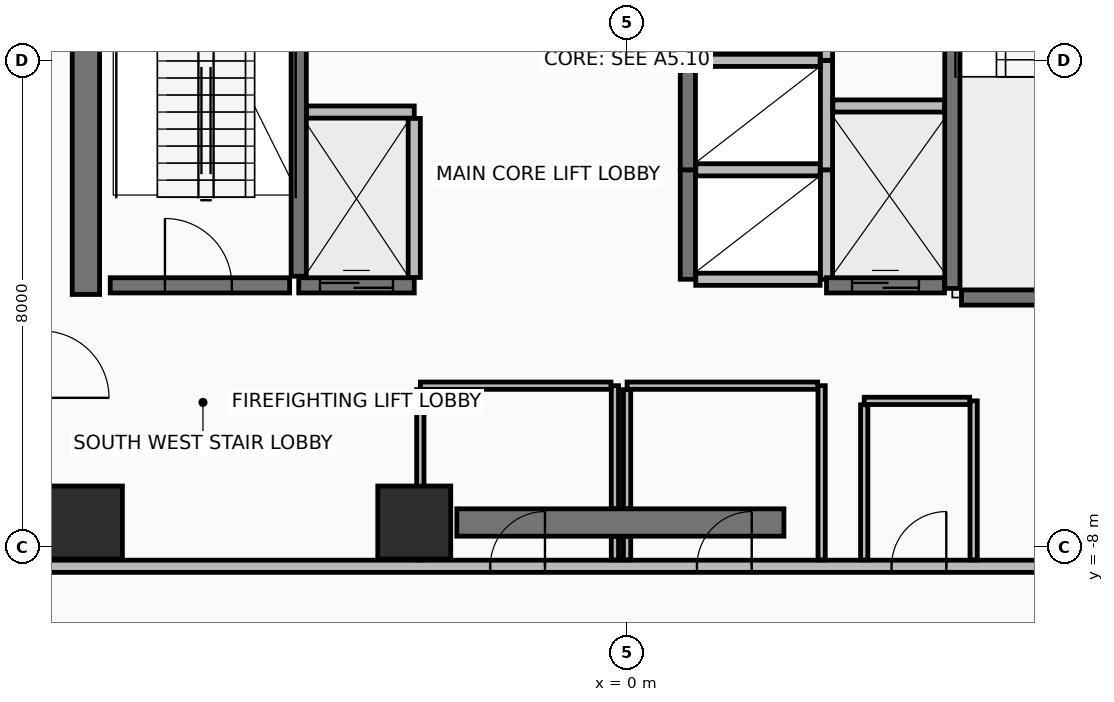
"""IFC4 building model, lengths in metres.
Left out: names, types, materials, properties, quantities, classifications, styles, units other than length and angle.
Written with IfcOpenShell. Run it as: python <this file> out.ifc"""

import sys

from ifc_helpers import new_model, si_unit, direction, frame, frame_2d, origin, origin_2d, place, context, subcontext, project, spatial, rectangle, extrude, element, fill, save


model = new_model("IFC4")
c1 = context("Model", 3, precision=1e-05, world=origin(), true_north=direction((0.0, 1.0)))
c2 = subcontext(c1, "Body", "Model", "MODEL_VIEW")
j1 = project(units=[si_unit("LENGTHUNIT", "METRE"), si_unit("PLANEANGLEUNIT", "RADIAN")], contexts=[c1])
p1 = place(None, origin())
s1 = spatial("IfcSite", under=j1, at=p1, CompositionType="ELEMENT")
p2 = place(p1, origin())
s2 = spatial("IfcBuilding", under=s1, at=p2, CompositionType="ELEMENT")
p3 = place(p2, frame((0.0, 0.0, 188.5)))
s3 = spatial("IfcBuildingStorey", under=s2, at=p3, CompositionType="ELEMENT", Elevation=188.5)
for number, where, z_axis, x_axis in (
    (1, (-8.9, -7.6, 0.0), (0.0, 0.0, 1.0), (1.0, 0.0, 0.0)),
    (2, (-3.5, -7.6, 0.0), (0.0, 0.0, 1.0), (1.0, 0.0, 0.0)),
):
    element("IfcColumn", number, at=place(p3, frame(where, z_axis=z_axis, x_axis=x_axis)), inside=s3, PredefinedType="COLUMN", context=c2, shape_type="SweptSolid", body=[
        extrude(rectangle(XDim=1.2, YDim=1.2, at=origin_2d()), origin(), (0.0, 0.0, 1.0), 3.6),
    ])
p4 = place(p3, frame((-2.8, -7.6, 0.0), z_axis=(0.0, 0.0, 1.0), x_axis=(1.0, 0.0, 0.0)))
e3 = element("IfcWall", 3, at=p4, inside=s3, PredefinedType="SHEAR", context=c2, shape_type="SweptSolid", body=[
    extrude(rectangle(XDim=5.38, YDim=0.45, at=frame_2d((2.69, 0.0))), origin(), (0.0, 0.0, 1.0), 3.42),
])
p5 = place(p3, frame((-8.9, -3.85, 0.0), z_axis=(0.0, 0.0, 1.0), x_axis=(0.0, 1.0, 0.0)))
e4 = element("IfcWall", 4, at=p5, inside=s3, PredefinedType="SHEAR", context=c2, shape_type="SweptSolid", body=[
    extrude(rectangle(XDim=10.7, YDim=0.45, at=frame_2d((5.35, 0.0))), origin(), (0.0, 0.0, 1.0), 3.42),
])
p6 = place(p3, frame((-9.62, -8.32, 0.0), z_axis=(0.0, 0.0, 1.0), x_axis=(1.0, 0.0, 0.0)))
e5 = element("IfcWall", 5, at=p6, inside=s3, PredefinedType="PARTITIONING", context=c2, shape_type="SweptSolid", body=[
    extrude(rectangle(XDim=19.24, YDim=0.2, at=frame_2d((9.62, 0.0))), origin(), (0.0, 0.0, 1.0), 2.865),
])
p7 = place(p6, frame((7.37, 0.0, 0.0)))
e6 = element("IfcOpeningElement", 6, at=p7, cuts=e5, PredefinedType="OPENING", context=c2, shape_type="SweptSolid", body=[
    extrude(rectangle(XDim=0.9, YDim=2.1, at=frame_2d((0.45, 1.05))), frame((0.0, 0.11, 0.0), z_axis=(0.0, -1.0, 0.0), x_axis=(1.0, 0.0, 0.0)), (0.0, 0.0, 1.0), 0.22),
])
p8 = place(p6, frame((10.77, 0.0, 0.0)))
e7 = element("IfcOpeningElement", 7, at=p8, cuts=e5, PredefinedType="OPENING", context=c2, shape_type="SweptSolid", body=[
    extrude(rectangle(XDim=0.9, YDim=2.1, at=frame_2d((0.45, 1.05))), frame((0.0, 0.11, 0.0), z_axis=(0.0, -1.0, 0.0), x_axis=(1.0, 0.0, 0.0)), (0.0, 0.0, 1.0), 0.22),
])
p9 = place(p6, frame((13.97, 0.0, 0.0)))
e8 = element("IfcOpeningElement", 8, at=p9, cuts=e5, PredefinedType="OPENING", context=c2, shape_type="SweptSolid", body=[
    extrude(rectangle(XDim=0.9, YDim=2.1, at=frame_2d((0.45, 1.05))), frame((0.0, 0.11, 0.0), z_axis=(0.0, -1.0, 0.0), x_axis=(1.0, 0.0, 0.0)), (0.0, 0.0, 1.0), 0.22),
])
p10 = place(p3, frame((-5.4, -3.55, 0.0), z_axis=(0.0, 0.0, 1.0), x_axis=(0.0, 1.0, 0.0)))
e9 = element("IfcWall", 9, at=p10, inside=s3, PredefinedType="SHEAR", context=c2, shape_type="SweptSolid", body=[
    extrude(rectangle(XDim=7.3, YDim=0.25, at=frame_2d((3.65, 0.0))), origin(), (0.0, 0.0, 1.0), 3.42),
])
p11 = place(p3, frame((-8.5, -3.7, 0.0), z_axis=(0.0, 0.0, 1.0), x_axis=(1.0, 0.0, 0.0)))
e10 = element("IfcWall", 10, at=p11, inside=s3, PredefinedType="SHEAR", context=c2, shape_type="SweptSolid", body=[
    extrude(rectangle(XDim=2.95, YDim=0.25, at=frame_2d((1.475, 0.0))), origin(), (0.0, 0.0, 1.0), 3.42),
])
p12 = place(p11, frame((0.9, 0.0, 0.0)))
e11 = element("IfcOpeningElement", 11, at=p12, cuts=e10, PredefinedType="OPENING", context=c2, shape_type="SweptSolid", body=[
    extrude(rectangle(XDim=1.1, YDim=2.15, at=frame_2d((0.55, 1.075))), frame((0.0, 0.135, 0.0), z_axis=(0.0, -1.0, 0.0), x_axis=(1.0, 0.0, 0.0)), (0.0, 0.0, 1.0), 0.27),
])
p13 = place(p3, frame((5.35, -3.75, 0.0), z_axis=(0.0, 0.0, 1.0), x_axis=(0.0, 1.0, 0.0)))
e12 = element("IfcWall", 12, at=p13, inside=s3, PredefinedType="SHEAR", context=c2, shape_type="SweptSolid", body=[
    extrude(rectangle(XDim=7.3, YDim=0.25, at=frame_2d((3.65, 0.0))), origin(), (0.0, 0.0, 1.0), 3.42),
])
p14 = place(p3, frame((5.5, -3.9, 0.0), z_axis=(0.0, 0.0, 1.0), x_axis=(1.0, 0.0, 0.0)))
e13 = element("IfcWall", 13, at=p14, inside=s3, PredefinedType="SHEAR", context=c2, shape_type="SweptSolid", body=[
    extrude(rectangle(XDim=3.0, YDim=0.25, at=frame_2d((1.5, 0.0))), origin(), (0.0, 0.0, 1.0), 3.42),
])
p15 = place(p3, frame((1.0, -3.6, 0.0), z_axis=(0.0, 0.0, 1.0), x_axis=(0.0, 1.0, 0.0)))
e14 = element("IfcWall", 14, at=p15, inside=s3, PredefinedType="SHEAR", context=c2, shape_type="SweptSolid", body=[
    extrude(rectangle(XDim=1.8, YDim=0.25, at=frame_2d((0.9, 0.0))), origin(), (0.0, 0.0, 1.0), 3.42),
])
p16 = place(p3, frame((3.28, -3.6, 0.0), z_axis=(0.0, 0.0, 1.0), x_axis=(0.0, 1.0, 0.0)))
e15 = element("IfcWall", 15, at=p16, inside=s3, PredefinedType="PARTITIONING", context=c2, shape_type="SweptSolid", body=[
    extrude(rectangle(XDim=1.8, YDim=0.2, at=frame_2d((0.9, 0.0))), origin(), (0.0, 0.0, 1.0), 3.42),
])
for number, where, z_axis, x_axis in (
    (16, (1.13, -3.6, 0.0), (0.0, 0.0, 1.0), (1.0, 0.0, 0.0)),
    (17, (1.13, -1.8, 0.0), (0.0, 0.0, 1.0), (1.0, 0.0, 0.0)),
):
    element("IfcWall", number, at=place(p3, frame(where, z_axis=z_axis, x_axis=x_axis)), inside=s3, PredefinedType="PARTITIONING", context=c2, shape_type="SweptSolid", body=[
        extrude(rectangle(XDim=2.045, YDim=0.2, at=frame_2d((1.022, 0.0))), origin(), (0.0, 0.0, 1.0), 3.42),
    ])
p17 = place(p3, frame((1.0, -1.8, 0.0), z_axis=(0.0, 0.0, 1.0), x_axis=(0.0, 1.0, 0.0)))
e18 = element("IfcWall", 18, at=p17, inside=s3, PredefinedType="SHEAR", context=c2, shape_type="SweptSolid", body=[
    extrude(rectangle(XDim=1.8, YDim=0.25, at=frame_2d((0.9, 0.0))), origin(), (0.0, 0.0, 1.0), 3.42),
])
p18 = place(p3, frame((3.28, -1.8, 0.0), z_axis=(0.0, 0.0, 1.0), x_axis=(0.0, 1.0, 0.0)))
e19 = element("IfcWall", 19, at=p18, inside=s3, PredefinedType="PARTITIONING", context=c2, shape_type="SweptSolid", body=[
    extrude(rectangle(XDim=1.8, YDim=0.2, at=frame_2d((0.9, 0.0))), origin(), (0.0, 0.0, 1.0), 3.42),
])
p19 = place(p3, frame((1.13, 0.0, 0.0), z_axis=(0.0, 0.0, 1.0), x_axis=(1.0, 0.0, 0.0)))
e20 = element("IfcWall", 20, at=p19, inside=s3, PredefinedType="PARTITIONING", context=c2, shape_type="SweptSolid", body=[
    extrude(rectangle(XDim=2.045, YDim=0.2, at=frame_2d((1.022, 0.0))), origin(), (0.0, 0.0, 1.0), 3.42),
])
p20 = place(p3, frame((1.0, 0.0, 0.0), z_axis=(0.0, 0.0, 1.0), x_axis=(0.0, 1.0, 0.0)))
e21 = element("IfcWall", 21, at=p20, inside=s3, PredefinedType="SHEAR", context=c2, shape_type="SweptSolid", body=[
    extrude(rectangle(XDim=1.8, YDim=0.25, at=frame_2d((0.9, 0.0))), origin(), (0.0, 0.0, 1.0), 3.42),
])
p21 = place(p3, frame((3.28, 0.0, 0.0), z_axis=(0.0, 0.0, 1.0), x_axis=(0.0, 1.0, 0.0)))
e22 = element("IfcWall", 22, at=p21, inside=s3, PredefinedType="PARTITIONING", context=c2, shape_type="SweptSolid", body=[
    extrude(rectangle(XDim=1.8, YDim=0.2, at=frame_2d((0.9, 0.0))), origin(), (0.0, 0.0, 1.0), 3.42),
])
p22 = place(p3, frame((-5.4, -3.7, 0.0), z_axis=(0.0, 0.0, 1.0), x_axis=(1.0, 0.0, 0.0)))
e23 = element("IfcWall", 23, at=p22, inside=s3, PredefinedType="SHEAR", context=c2, shape_type="SweptSolid", body=[
    extrude(rectangle(XDim=1.9, YDim=0.25, at=frame_2d((0.95, 0.0))), origin(), (0.0, 0.0, 1.0), 3.42),
])
p23 = place(p22, frame((0.35, 0.0, 0.0)))
e24 = element("IfcOpeningElement", 24, at=p23, cuts=e23, PredefinedType="OPENING", context=c2, shape_type="SweptSolid", body=[
    extrude(rectangle(XDim=1.2, YDim=2.2, at=frame_2d((0.6, 1.1))), frame((0.0, 0.135, 0.0), z_axis=(0.0, -1.0, 0.0), x_axis=(1.0, 0.0, 0.0)), (0.0, 0.0, 1.0), 0.27),
])
p24 = place(p3, frame((-5.27, -0.85, 0.0), z_axis=(0.0, 0.0, 1.0), x_axis=(1.0, 0.0, 0.0)))
e25 = element("IfcWall", 25, at=p24, inside=s3, PredefinedType="PARTITIONING", context=c2, shape_type="SweptSolid", body=[
    extrude(rectangle(XDim=1.77, YDim=0.2, at=frame_2d((0.885, 0.0))), origin(), (0.0, 0.0, 1.0), 3.42),
])
p25 = place(p3, frame((-3.5, -3.57, 0.0), z_axis=(0.0, 0.0, 1.0), x_axis=(0.0, 1.0, 0.0)))
e26 = element("IfcWall", 26, at=p25, inside=s3, PredefinedType="PARTITIONING", context=c2, shape_type="SweptSolid", body=[
    extrude(rectangle(XDim=2.615, YDim=0.2, at=frame_2d((1.308, 0.0))), origin(), (0.0, 0.0, 1.0), 3.42),
])
p26 = place(p3, frame((3.28, -3.7, 0.0), z_axis=(0.0, 0.0, 1.0), x_axis=(1.0, 0.0, 0.0)))
e27 = element("IfcWall", 27, at=p26, inside=s3, PredefinedType="SHEAR", context=c2, shape_type="SweptSolid", body=[
    extrude(rectangle(XDim=1.94, YDim=0.25, at=frame_2d((0.97, 0.0))), origin(), (0.0, 0.0, 1.0), 3.42),
])
p27 = place(p26, frame((0.42, 0.0, 0.0)))
e28 = element("IfcOpeningElement", 28, at=p27, cuts=e27, PredefinedType="OPENING", context=c2, shape_type="SweptSolid", body=[
    extrude(rectangle(XDim=1.1, YDim=2.2, at=frame_2d((0.55, 1.1))), frame((0.0, 0.135, 0.0), z_axis=(0.0, -1.0, 0.0), x_axis=(1.0, 0.0, 0.0)), (0.0, 0.0, 1.0), 0.27),
])
p28 = place(p3, frame((3.385, -0.75, 0.0), z_axis=(0.0, 0.0, 1.0), x_axis=(1.0, 0.0, 0.0)))
e29 = element("IfcWall", 29, at=p28, inside=s3, PredefinedType="PARTITIONING", context=c2, shape_type="SweptSolid", body=[
    extrude(rectangle(XDim=1.835, YDim=0.2, at=frame_2d((0.917, 0.0))), origin(), (0.0, 0.0, 1.0), 3.42),
])
p29 = place(p3, frame((-0.2, -8.215, 0.0), z_axis=(0.0, 0.0, 1.0), x_axis=(0.0, 1.0, 0.0)))
e30 = element("IfcWall", 30, at=p29, inside=s3, PredefinedType="PARTITIONING", context=c2, shape_type="SweptSolid", body=[
    extrude(rectangle(XDim=0.385, YDim=0.12, at=frame_2d((0.192, 0.0))), origin(), (0.0, 0.0, 1.0), 2.715),
])
p30 = place(p3, frame((-0.2, -7.37, 0.0), z_axis=(0.0, 0.0, 1.0), x_axis=(0.0, 1.0, 0.0)))
e31 = element("IfcWall", 31, at=p30, inside=s3, PredefinedType="PARTITIONING", context=c2, shape_type="SweptSolid", body=[
    extrude(rectangle(XDim=2.02, YDim=0.12, at=frame_2d((1.01, 0.0))), origin(), (0.0, 0.0, 1.0), 2.715),
])
p31 = place(p3, frame((-0.265, -5.35, 0.0), z_axis=(0.0, 0.0, 1.0), x_axis=(-1.0, 0.0, 0.0)))
e32 = element("IfcWall", 32, at=p31, inside=s3, PredefinedType="PARTITIONING", context=c2, shape_type="SweptSolid", body=[
    extrude(rectangle(XDim=3.135, YDim=0.12, at=frame_2d((1.567, 0.0))), origin(), (0.0, 0.0, 1.0), 2.715),
])
p32 = place(p3, frame((-3.4, -5.415, 0.0), z_axis=(0.0, 0.0, 1.0), x_axis=(0.0, -1.0, 0.0)))
e33 = element("IfcWall", 33, at=p32, inside=s3, PredefinedType="PARTITIONING", context=c2, shape_type="SweptSolid", body=[
    extrude(rectangle(XDim=2.8, YDim=0.12, at=frame_2d((1.4, 0.0))), origin(), (0.0, 0.0, 1.0), 2.715),
])
p33 = place(p3, frame((3.2, -8.215, 0.0), z_axis=(0.0, 0.0, 1.0), x_axis=(0.0, 1.0, 0.0)))
e34 = element("IfcWall", 34, at=p33, inside=s3, PredefinedType="PARTITIONING", context=c2, shape_type="SweptSolid", body=[
    extrude(rectangle(XDim=2.865, YDim=0.12, at=frame_2d((1.433, 0.0))), origin(), (0.0, 0.0, 1.0), 2.715),
])
p34 = place(p3, frame((3.135, -5.35, 0.0), z_axis=(0.0, 0.0, 1.0), x_axis=(-1.0, 0.0, 0.0)))
e35 = element("IfcWall", 35, at=p34, inside=s3, PredefinedType="PARTITIONING", context=c2, shape_type="SweptSolid", body=[
    extrude(rectangle(XDim=3.135, YDim=0.12, at=frame_2d((1.567, 0.0))), origin(), (0.0, 0.0, 1.0), 3.42),
])
p35 = place(p3, frame((0.0, -5.415, 0.0), z_axis=(0.0, 0.0, 1.0), x_axis=(0.0, -1.0, 0.0)))
e36 = element("IfcWall", 36, at=p35, inside=s3, PredefinedType="PARTITIONING", context=c2, shape_type="SweptSolid", body=[
    extrude(rectangle(XDim=1.955, YDim=0.12, at=frame_2d((0.978, 0.0))), origin(), (0.0, 0.0, 1.0), 2.715),
])
p36 = place(p3, frame((0.0, -7.83, 0.0), z_axis=(0.0, 0.0, 1.0), x_axis=(0.0, -1.0, 0.0)))
e37 = element("IfcWall", 37, at=p36, inside=s3, PredefinedType="PARTITIONING", context=c2, shape_type="SweptSolid", body=[
    extrude(rectangle(XDim=0.385, YDim=0.12, at=frame_2d((0.192, 0.0))), origin(), (0.0, 0.0, 1.0), 2.715),
])
p37 = place(p3, frame((5.7, -8.215, 0.0), z_axis=(0.0, 0.0, 1.0), x_axis=(0.0, 1.0, 0.0)))
e38 = element("IfcWall", 38, at=p37, inside=s3, PredefinedType="PARTITIONING", context=c2, shape_type="SweptSolid", body=[
    extrude(rectangle(XDim=2.615, YDim=0.12, at=frame_2d((1.308, 0.0))), origin(), (0.0, 0.0, 1.0), 2.715),
])
p38 = place(p3, frame((5.635, -5.6, 0.0), z_axis=(0.0, 0.0, 1.0), x_axis=(-1.0, 0.0, 0.0)))
e39 = element("IfcWall", 39, at=p38, inside=s3, PredefinedType="PARTITIONING", context=c2, shape_type="SweptSolid", body=[
    extrude(rectangle(XDim=1.735, YDim=0.12, at=frame_2d((0.868, 0.0))), origin(), (0.0, 0.0, 1.0), 3.42),
])
p39 = place(p3, frame((3.9, -5.665, 0.0), z_axis=(0.0, 0.0, 1.0), x_axis=(0.0, -1.0, 0.0)))
e40 = element("IfcWall", 40, at=p39, inside=s3, PredefinedType="PARTITIONING", context=c2, shape_type="SweptSolid", body=[
    extrude(rectangle(XDim=2.55, YDim=0.12, at=frame_2d((1.275, 0.0))), origin(), (0.0, 0.0, 1.0), 2.715),
])
p40 = place(p3, frame((22.994, -8.481, 0.0), z_axis=(0.0, 0.0, 1.0), x_axis=(-0.766042878482, -0.642789474343, 0.0)))
e41 = element("IfcWall", 41, at=p40, inside=s3, PredefinedType="PARTITIONING", context=c2, shape_type="SweptSolid", body=[
    extrude(rectangle(XDim=21.521, YDim=0.15, at=frame_2d((10.761, 0.0))), origin(), (0.0, 0.0, 1.0), 3.42),
])
p41 = place(p12, origin())
e42 = element("IfcDoor", 42, at=p41, inside=s3, OperationType="SINGLE_SWING_LEFT", PredefinedType="DOOR", context=c2, shape_type="SweptSolid", body=[
    extrude(rectangle(XDim=1.1, YDim=2.15, at=frame_2d((0.55, 1.075))), frame((0.0, 0.025, 0.0), z_axis=(0.0, -1.0, 0.0), x_axis=(1.0, 0.0, 0.0)), (0.0, 0.0, 1.0), 0.05),
])
fill(e11, e42)
p42 = place(p23, origin())
e43 = element("IfcDoor", 43, at=p42, inside=s3, OperationType="SLIDING_TO_RIGHT", PredefinedType="DOOR", context=c2, shape_type="SweptSolid", body=[
    extrude(rectangle(XDim=1.2, YDim=2.2, at=frame_2d((0.6, 1.1))), frame((0.0, 0.025, 0.0), z_axis=(0.0, -1.0, 0.0), x_axis=(1.0, 0.0, 0.0)), (0.0, 0.0, 1.0), 0.05),
])
fill(e24, e43)
p43 = place(p27, origin())
e44 = element("IfcDoor", 44, at=p43, inside=s3, OperationType="SLIDING_TO_LEFT", PredefinedType="DOOR", context=c2, shape_type="SweptSolid", body=[
    extrude(rectangle(XDim=1.1, YDim=2.2, at=frame_2d((0.55, 1.1))), frame((0.0, 0.025, 0.0), z_axis=(0.0, -1.0, 0.0), x_axis=(1.0, 0.0, 0.0)), (0.0, 0.0, 1.0), 0.05),
])
fill(e28, e44)
p44 = place(p7, frame((0.9, 0.0, 0.0), z_axis=(0.0, 0.0, 1.0), x_axis=(-1.0, 0.0, 0.0)))
e45 = element("IfcDoor", 45, at=p44, inside=s3, OperationType="SINGLE_SWING_LEFT", PredefinedType="DOOR", context=c2, shape_type="SweptSolid", body=[
    extrude(rectangle(XDim=0.9, YDim=2.1, at=frame_2d((0.45, 1.05))), frame((0.0, 0.025, 0.0), z_axis=(0.0, -1.0, 0.0), x_axis=(1.0, 0.0, 0.0)), (0.0, 0.0, 1.0), 0.05),
])
fill(e6, e45)
p45 = place(p8, frame((0.9, 0.0, 0.0), z_axis=(0.0, 0.0, 1.0), x_axis=(-1.0, 0.0, 0.0)))
e46 = element("IfcDoor", 46, at=p45, inside=s3, OperationType="SINGLE_SWING_LEFT", PredefinedType="DOOR", context=c2, shape_type="SweptSolid", body=[
    extrude(rectangle(XDim=0.9, YDim=2.1, at=frame_2d((0.45, 1.05))), frame((0.0, 0.025, 0.0), z_axis=(0.0, -1.0, 0.0), x_axis=(1.0, 0.0, 0.0)), (0.0, 0.0, 1.0), 0.05),
])
fill(e7, e46)
p46 = place(p9, frame((0.9, 0.0, 0.0), z_axis=(0.0, 0.0, 1.0), x_axis=(-1.0, 0.0, 0.0)))
e47 = element("IfcDoor", 47, at=p46, inside=s3, OperationType="SINGLE_SWING_LEFT", PredefinedType="DOOR", context=c2, shape_type="SweptSolid", body=[
    extrude(rectangle(XDim=0.9, YDim=2.1, at=frame_2d((0.45, 1.05))), frame((0.0, 0.025, 0.0), z_axis=(0.0, -1.0, 0.0), x_axis=(1.0, 0.0, 0.0)), (0.0, 0.0, 1.0), 0.05),
])
fill(e8, e47)
save(model, sys.argv[1])
